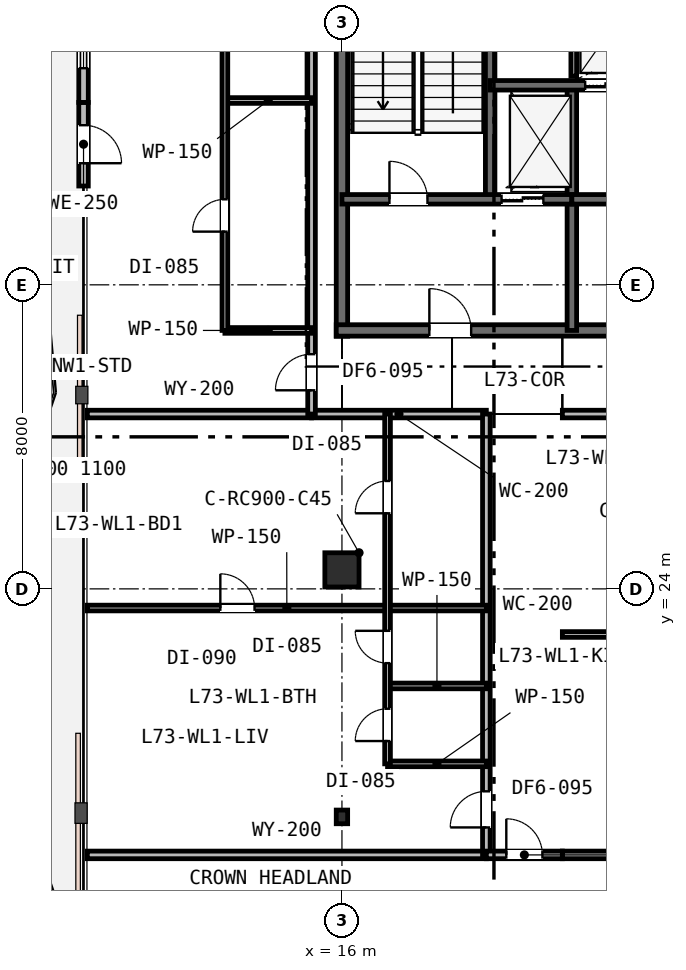
"""IFC4 building model, lengths in metres.
Left out: names, types, materials, properties, quantities, classifications, styles, units other than length and angle.
Written with IfcOpenShell. Run it as: python <this file> out.ifc"""

import sys

from ifc_helpers import new_model, si_unit, direction, frame, frame_2d, origin, origin_2d, place, context, subcontext, project, spatial, rectangle, i_section, extrude, element, fill, save


model = new_model("IFC4")
c1 = context("Model", 3, precision=1e-05, world=origin(), true_north=direction((0.0, 1.0)))
c2 = subcontext(c1, "Body", "Model", "MODEL_VIEW")
j1 = project(units=[si_unit("LENGTHUNIT", "METRE"), si_unit("PLANEANGLEUNIT", "RADIAN")], contexts=[c1])
p1 = place(None, origin())
s1 = spatial("IfcSite", under=j1, at=p1, CompositionType="ELEMENT")
p2 = place(p1, origin())
s2 = spatial("IfcBuilding", under=s1, at=p2, CompositionType="ELEMENT")
p3 = place(p2, frame((0.0, 0.0, 283.0)))
s3 = spatial("IfcBuildingStorey", under=s2, at=p3, CompositionType="ELEMENT", Elevation=283.0)
p4 = place(p3, frame((16.0, 30.65, 0.0), z_axis=(0.0, 0.0, 1.0), x_axis=(0.0, 1.0, 0.0)))
e1 = element("IfcWall", 1, at=p4, inside=s3, PredefinedType="SHEAR", context=c2, shape_type="SweptSolid", body=[
    extrude(rectangle(XDim=12.3, YDim=0.3, at=frame_2d((6.15, 0.0))), origin(), (0.0, 0.0, 1.0), 3.8),
])
p5 = place(p3, frame((15.85, 30.8, 0.0), z_axis=(0.0, 0.0, 1.0), x_axis=(1.0, 0.0, 0.0)))
e2 = element("IfcWall", 2, at=p5, inside=s3, PredefinedType="SHEAR", context=c2, shape_type="SweptSolid", body=[
    extrude(rectangle(XDim=11.2, YDim=0.3, at=frame_2d((5.6, 0.0))), origin(), (0.0, 0.0, 1.0), 3.8),
])
p6 = place(p5, frame((2.45, 0.0, 0.0)))
e3 = element("IfcOpeningElement", 3, at=p6, cuts=e2, PredefinedType="OPENING", context=c2, shape_type="SweptSolid", body=[
    extrude(rectangle(XDim=1.1, YDim=2.15, at=frame_2d((0.55, 1.075))), frame((0.0, 0.16, 0.0), z_axis=(0.0, -1.0, 0.0), x_axis=(1.0, 0.0, 0.0)), (0.0, 0.0, 1.0), 0.32),
])
p7 = place(p3, frame((19.9, 34.25, 0.0), z_axis=(0.0, 0.0, 1.0), x_axis=(0.0, 1.0, 0.0)))
e4 = element("IfcWall", 4, at=p7, inside=s3, PredefinedType="SHEAR", context=c2, shape_type="SweptSolid", body=[
    extrude(rectangle(XDim=8.65, YDim=0.25, at=frame_2d((4.325, 0.0))), origin(), (0.0, 0.0, 1.0), 3.8),
])
p8 = place(p3, frame((22.05, 30.8, 0.0), z_axis=(0.0, 0.0, 1.0), x_axis=(0.0, 1.0, 0.0)))
e5 = element("IfcWall", 5, at=p8, inside=s3, PredefinedType="SHEAR", context=c2, shape_type="SweptSolid", body=[
    extrude(rectangle(XDim=6.45, YDim=0.25, at=frame_2d((3.225, 0.0))), origin(), (0.0, 0.0, 1.0), 3.8),
])
p9 = place(p3, frame((16.0, 34.25, 0.0), z_axis=(0.0, 0.0, 1.0), x_axis=(1.0, 0.0, 0.0)))
e6 = element("IfcWall", 6, at=p9, inside=s3, PredefinedType="SHEAR", context=c2, shape_type="SweptSolid", body=[
    extrude(rectangle(XDim=6.05, YDim=0.25, at=frame_2d((3.025, 0.0))), origin(), (0.0, 0.0, 1.0), 3.8),
])
p10 = place(p9, frame((1.25, 0.0, 0.0)))
e7 = element("IfcOpeningElement", 7, at=p10, cuts=e6, PredefinedType="OPENING", context=c2, shape_type="SweptSolid", body=[
    extrude(rectangle(XDim=1.0, YDim=2.15, at=frame_2d((0.5, 1.075))), frame((0.0, 0.135, 0.0), z_axis=(0.0, -1.0, 0.0), x_axis=(1.0, 0.0, 0.0)), (0.0, 0.0, 1.0), 0.27),
])
p11 = place(p9, frame((4.2, 0.0, 0.0)))
e8 = element("IfcOpeningElement", 8, at=p11, cuts=e6, PredefinedType="OPENING", context=c2, shape_type="SweptSolid", body=[
    extrude(rectangle(XDim=1.1, YDim=2.15, at=frame_2d((0.55, 1.075))), frame((0.0, 0.135, 0.0), z_axis=(0.0, -1.0, 0.0), x_axis=(1.0, 0.0, 0.0)), (0.0, 0.0, 1.0), 0.27),
])
p12 = place(p3, frame((22.05, 34.25, 0.0), z_axis=(0.0, 0.0, 1.0), x_axis=(1.0, 0.0, 0.0)))
e9 = element("IfcWall", 9, at=p12, inside=s3, PredefinedType="SHEAR", context=c2, shape_type="SweptSolid", body=[
    extrude(rectangle(XDim=5.0, YDim=0.25, at=frame_2d((2.5, 0.0))), origin(), (0.0, 0.0, 1.0), 3.8),
])
p13 = place(p12, frame((1.95, 0.0, 0.0)))
e10 = element("IfcOpeningElement", 10, at=p13, cuts=e9, PredefinedType="OPENING", context=c2, shape_type="SweptSolid", body=[
    extrude(rectangle(XDim=1.0, YDim=2.15, at=frame_2d((0.5, 1.075))), frame((0.0, 0.135, 0.0), z_axis=(0.0, -1.0, 0.0), x_axis=(1.0, 0.0, 0.0)), (0.0, 0.0, 1.0), 0.27),
])
p14 = place(p3, frame((19.9, 37.25, 0.0), z_axis=(0.0, 0.0, 1.0), x_axis=(1.0, 0.0, 0.0)))
e11 = element("IfcWall", 11, at=p14, inside=s3, PredefinedType="SHEAR", context=c2, shape_type="SweptSolid", body=[
    extrude(rectangle(XDim=16.2, YDim=0.25, at=frame_2d((8.1, 0.0))), origin(), (0.0, 0.0, 1.0), 3.8),
])
p15 = place(p14, frame((12.55, 0.0, 0.0)))
e12 = element("IfcOpeningElement", 12, at=p15, cuts=e11, PredefinedType="OPENING", context=c2, shape_type="SweptSolid", body=[
    extrude(rectangle(XDim=0.9, YDim=2.15, at=frame_2d((0.45, 1.075))), frame((0.0, 0.135, 0.0), z_axis=(0.0, -1.0, 0.0), x_axis=(1.0, 0.0, 0.0)), (0.0, 0.0, 1.0), 0.27),
])
p16 = place(p14, frame((2.5, 0.0, 0.0)))
e13 = element("IfcOpeningElement", 13, at=p16, cuts=e11, PredefinedType="OPENING", context=c2, shape_type="SweptSolid", body=[
    extrude(rectangle(XDim=1.05, YDim=2.15, at=frame_2d((0.525, 1.075))), frame((0.0, 0.135, 0.0), z_axis=(0.0, -1.0, 0.0), x_axis=(1.0, 0.0, 0.0)), (0.0, 0.0, 1.0), 0.27),
])
p17 = place(p14, frame((4.4, 0.0, 0.0)))
e14 = element("IfcOpeningElement", 14, at=p17, cuts=e11, PredefinedType="OPENING", context=c2, shape_type="SweptSolid", body=[
    extrude(rectangle(XDim=1.05, YDim=2.15, at=frame_2d((0.525, 1.075))), frame((0.0, 0.135, 0.0), z_axis=(0.0, -1.0, 0.0), x_axis=(1.0, 0.0, 0.0)), (0.0, 0.0, 1.0), 0.27),
])
p18 = place(p14, frame((6.3, 0.0, 0.0)))
e15 = element("IfcOpeningElement", 15, at=p18, cuts=e11, PredefinedType="OPENING", context=c2, shape_type="SweptSolid", body=[
    extrude(rectangle(XDim=1.05, YDim=2.15, at=frame_2d((0.525, 1.075))), frame((0.0, 0.135, 0.0), z_axis=(0.0, -1.0, 0.0), x_axis=(1.0, 0.0, 0.0)), (0.0, 0.0, 1.0), 0.27),
])
p19 = place(p3, frame((16.0, 24.5, 0.0), z_axis=(0.0, 0.0, 1.0), x_axis=(1.0, 0.0, 0.0)))
e16 = element("IfcColumn", 16, at=p19, inside=s3, PredefinedType="COLUMN", context=c2, shape_type="SweptSolid", body=[
    extrude(rectangle(XDim=0.9, YDim=0.9, at=origin_2d()), origin(), (0.0, 0.0, 1.0), 3.8),
])
p20 = place(p3, frame((16.0, 18.0, 0.0), z_axis=(0.0, 0.0, 1.0), x_axis=(1.0, 0.0, 0.0)))
e17 = element("IfcColumn", 17, at=p20, inside=s3, PredefinedType="COLUMN", context=c2, shape_type="SweptSolid", body=[
    extrude(i_section(OverallWidth=0.3, OverallDepth=0.36, WebThickness=0.013, FlangeThickness=0.022, FilletRadius=0.027, at=origin_2d()), origin(), (0.0, 0.0, 1.0), 3.8),
])
p21 = place(p3, frame((9.2, 36.8, 0.0), z_axis=(0.0, 0.0, 1.0), x_axis=(0.0, -1.0, 0.0)))
e18 = element("IfcWall", 18, at=p21, inside=s3, PredefinedType="STANDARD", context=c2, shape_type="SweptSolid", body=[
    extrude(rectangle(XDim=2.2, YDim=0.25, at=frame_2d((1.1, 0.0))), origin(), (0.0, 0.0, 1.0), 3.53),
])
p22 = place(p21, frame((0.6, 0.0, 0.0)))
e19 = element("IfcOpeningElement", 19, at=p22, cuts=e18, PredefinedType="OPENING", context=c2, shape_type="SweptSolid", body=[
    extrude(rectangle(XDim=1.0, YDim=2.15, at=frame_2d((0.5, 1.075))), frame((0.0, 0.135, 0.0), z_axis=(0.0, -1.0, 0.0), x_axis=(1.0, 0.0, 0.0)), (0.0, 0.0, 1.0), 0.27),
])
p23 = place(p3, frame((9.2, 40.4, 0.0), z_axis=(0.0, 0.0, 1.0), x_axis=(0.0, -1.0, 0.0)))
e20 = element("IfcWall", 20, at=p23, inside=s3, PredefinedType="STANDARD", context=c2, shape_type="SweptSolid", body=[
    extrude(rectangle(XDim=3.6, YDim=0.25, at=frame_2d((1.8, 0.0))), origin(), (0.0, 0.0, 1.0), 3.53),
])
p24 = place(p23, frame((0.9, 0.0, 0.75)))
e21 = element("IfcOpeningElement", 21, at=p24, cuts=e20, PredefinedType="OPENING", context=c2, shape_type="SweptSolid", body=[
    extrude(rectangle(XDim=1.8, YDim=1.85, at=frame_2d((0.9, 0.925))), frame((0.0, 0.135, 0.0), z_axis=(0.0, -1.0, 0.0), x_axis=(1.0, 0.0, 0.0)), (0.0, 0.0, 1.0), 0.27),
])
p25 = place(p3, frame((22.1, 37.49, 0.0), z_axis=(0.0, 0.0, 1.0), x_axis=(0.0, 1.0, 0.0)))
e22 = element("IfcWall", 22, at=p25, inside=s3, PredefinedType="PLUMBINGWALL", context=c2, shape_type="SweptSolid", body=[
    extrude(rectangle(XDim=2.56, YDim=0.15, at=frame_2d((1.28, 0.0))), origin(), (0.0, 0.0, 1.0), 3.53),
])
p26 = place(p3, frame((9.3, 28.6, 0.0), z_axis=(0.0, 0.0, 1.0), x_axis=(1.0, 0.0, 0.0)))
e23 = element("IfcWall", 23, at=p26, inside=s3, PredefinedType="PARTITIONING", context=c2, shape_type="SweptSolid", body=[
    extrude(rectangle(XDim=5.9, YDim=0.2, at=frame_2d((2.95, 0.0))), origin(), (0.0, 0.0, 1.0), 3.53),
])
p27 = place(p3, frame((15.2, 28.6, 0.0), z_axis=(0.0, 0.0, 1.0), x_axis=(1.0, 0.0, 0.0)))
e24 = element("IfcWall", 24, at=p27, inside=s3, PredefinedType="PARTITIONING", context=c2, shape_type="SweptSolid", body=[
    extrude(rectangle(XDim=4.6, YDim=0.2, at=frame_2d((2.3, 0.0))), origin(), (0.0, 0.0, 1.0), 3.24),
])
p28 = place(p3, frame((21.8, 28.6, 0.0), z_axis=(0.0, 0.0, 1.0), x_axis=(1.0, 0.0, 0.0)))
e25 = element("IfcWall", 25, at=p28, inside=s3, PredefinedType="PARTITIONING", context=c2, shape_type="SweptSolid", body=[
    extrude(rectangle(XDim=24.1, YDim=0.2, at=frame_2d((12.05, 0.0))), origin(), (0.0, 0.0, 1.0), 3.24),
])
p29 = place(p28, frame((5.525, 0.0, 0.0)))
e26 = element("IfcOpeningElement", 26, at=p29, cuts=e25, PredefinedType="OPENING", context=c2, shape_type="SweptSolid", body=[
    extrude(rectangle(XDim=0.95, YDim=2.15, at=frame_2d((0.475, 1.075))), frame((0.0, 0.11, 0.0), z_axis=(0.0, -1.0, 0.0), x_axis=(1.0, 0.0, 0.0)), (0.0, 0.0, 1.0), 0.22),
])
p30 = place(p28, frame((13.025, 0.0, 0.0)))
e27 = element("IfcOpeningElement", 27, at=p30, cuts=e25, PredefinedType="OPENING", context=c2, shape_type="SweptSolid", body=[
    extrude(rectangle(XDim=0.95, YDim=2.15, at=frame_2d((0.475, 1.075))), frame((0.0, 0.11, 0.0), z_axis=(0.0, -1.0, 0.0), x_axis=(1.0, 0.0, 0.0)), (0.0, 0.0, 1.0), 0.22),
])
p31 = place(p28, frame((17.625, 0.0, 0.0)))
e28 = element("IfcOpeningElement", 28, at=p31, cuts=e25, PredefinedType="OPENING", context=c2, shape_type="SweptSolid", body=[
    extrude(rectangle(XDim=0.95, YDim=2.15, at=frame_2d((0.475, 1.075))), frame((0.0, 0.11, 0.0), z_axis=(0.0, -1.0, 0.0), x_axis=(1.0, 0.0, 0.0)), (0.0, 0.0, 1.0), 0.22),
])
p32 = place(p3, frame((15.2, 28.6, 0.0), z_axis=(0.0, 0.0, 1.0), x_axis=(0.0, 1.0, 0.0)))
e29 = element("IfcWall", 29, at=p32, inside=s3, PredefinedType="PARTITIONING", context=c2, shape_type="SweptSolid", body=[
    extrude(rectangle(XDim=14.3, YDim=0.2, at=frame_2d((7.15, 0.0))), origin(), (0.0, 0.0, 1.0), 3.53),
])
p33 = place(p32, frame((0.625, 0.0, 0.0)))
e30 = element("IfcOpeningElement", 30, at=p33, cuts=e29, PredefinedType="OPENING", context=c2, shape_type="SweptSolid", body=[
    extrude(rectangle(XDim=0.95, YDim=2.15, at=frame_2d((0.475, 1.075))), frame((0.0, 0.11, 0.0), z_axis=(0.0, -1.0, 0.0), x_axis=(1.0, 0.0, 0.0)), (0.0, 0.0, 1.0), 0.22),
])
for number, where, z_axis, x_axis in (
    (31, (12.92, 30.8, 0.0), (0.0, 0.0, 1.0), (1.0, 0.0, 0.0)),
    (32, (12.92, 36.85, 0.0), (0.0, 0.0, 1.0), (1.0, 0.0, 0.0)),
):
    element("IfcWall", number, at=place(p3, frame(where, z_axis=z_axis, x_axis=x_axis)), inside=s3, PredefinedType="PARTITIONING", context=c2, shape_type="SweptSolid", body=[
        extrude(rectangle(XDim=2.28, YDim=0.15, at=frame_2d((1.14, 0.0))), origin(), (0.0, 0.0, 1.0), 3.53),
    ])
p34 = place(p3, frame((12.92, 30.8, 0.0), z_axis=(0.0, 0.0, 1.0), x_axis=(0.0, 1.0, 0.0)))
e33 = element("IfcWall", 33, at=p34, inside=s3, PredefinedType="PARTITIONING", context=c2, shape_type="SweptSolid", body=[
    extrude(rectangle(XDim=12.1, YDim=0.15, at=frame_2d((6.05, 0.0))), origin(), (0.0, 0.0, 1.0), 3.53),
])
p35 = place(p34, frame((2.6, 0.0, 0.0)))
e34 = element("IfcOpeningElement", 34, at=p35, cuts=e33, PredefinedType="OPENING", context=c2, shape_type="SweptSolid", body=[
    extrude(rectangle(XDim=0.85, YDim=2.15, at=frame_2d((0.425, 1.075))), frame((0.0, 0.085, 0.0), z_axis=(0.0, -1.0, 0.0), x_axis=(1.0, 0.0, 0.0)), (0.0, 0.0, 1.0), 0.17),
])
p36 = place(p34, frame((8.65, 0.0, 0.0)))
e35 = element("IfcOpeningElement", 35, at=p36, cuts=e33, PredefinedType="OPENING", context=c2, shape_type="SweptSolid", body=[
    extrude(rectangle(XDim=0.85, YDim=2.15, at=frame_2d((0.425, 1.075))), frame((0.0, 0.085, 0.0), z_axis=(0.0, -1.0, 0.0), x_axis=(1.0, 0.0, 0.0)), (0.0, 0.0, 1.0), 0.17),
])
p37 = place(p3, frame((9.3, 17.0, 0.0), z_axis=(0.0, 0.0, 1.0), x_axis=(1.0, 0.0, 0.0)))
e36 = element("IfcWall", 36, at=p37, inside=s3, PredefinedType="PARTITIONING", context=c2, shape_type="SweptSolid", body=[
    extrude(rectangle(XDim=10.5, YDim=0.2, at=frame_2d((5.25, 0.0))), origin(), (0.0, 0.0, 1.0), 3.24),
])
p38 = place(p3, frame((21.8, 17.0, 0.0), z_axis=(0.0, 0.0, 1.0), x_axis=(1.0, 0.0, 0.0)))
e37 = element("IfcWall", 37, at=p38, inside=s3, PredefinedType="PARTITIONING", context=c2, shape_type="SweptSolid", body=[
    extrude(rectangle(XDim=2.1, YDim=0.2, at=frame_2d((1.05, 0.0))), origin(), (0.0, 0.0, 1.0), 3.53),
])
p39 = place(p3, frame((19.8, 17.0, 0.0), z_axis=(0.0, 0.0, 1.0), x_axis=(0.0, 1.0, 0.0)))
e38 = element("IfcWall", 38, at=p39, inside=s3, PredefinedType="PARTITIONING", context=c2, shape_type="SweptSolid", body=[
    extrude(rectangle(XDim=11.6, YDim=0.2, at=frame_2d((5.8, 0.0))), origin(), (0.0, 0.0, 1.0), 3.24),
])
p40 = place(p39, frame((0.723, 0.0, 0.0)))
e39 = element("IfcOpeningElement", 39, at=p40, cuts=e38, PredefinedType="OPENING", context=c2, shape_type="SweptSolid", body=[
    extrude(rectangle(XDim=0.95, YDim=2.15, at=frame_2d((0.475, 1.075))), frame((0.0, 0.11, 0.0), z_axis=(0.0, -1.0, 0.0), x_axis=(1.0, 0.0, 0.0)), (0.0, 0.0, 1.0), 0.22),
])
for number, where, z_axis, x_axis in (
    (40, (17.2, 19.396, 0.0), (0.0, 0.0, 1.0), (1.0, 0.0, 0.0)),
    (41, (17.2, 21.446, 0.0), (0.0, 0.0, 1.0), (1.0, 0.0, 0.0)),
):
    element("IfcWall", number, at=place(p3, frame(where, z_axis=z_axis, x_axis=x_axis)), inside=s3, PredefinedType="PARTITIONING", context=c2, shape_type="SweptSolid", body=[
        extrude(rectangle(XDim=2.6, YDim=0.15, at=frame_2d((1.3, 0.0))), origin(), (0.0, 0.0, 1.0), 3.53),
    ])
p41 = place(p3, frame((9.3, 23.496, 0.0), z_axis=(0.0, 0.0, 1.0), x_axis=(1.0, 0.0, 0.0)))
e42 = element("IfcWall", 42, at=p41, inside=s3, PredefinedType="PARTITIONING", context=c2, shape_type="SweptSolid", body=[
    extrude(rectangle(XDim=10.5, YDim=0.15, at=frame_2d((5.25, 0.0))), origin(), (0.0, 0.0, 1.0), 3.24),
])
p42 = place(p41, frame((3.5, 0.0, 0.0)))
e43 = element("IfcOpeningElement", 43, at=p42, cuts=e42, PredefinedType="OPENING", context=c2, shape_type="SweptSolid", body=[
    extrude(rectangle(XDim=0.9, YDim=2.15, at=frame_2d((0.45, 1.075))), frame((0.0, 0.085, 0.0), z_axis=(0.0, -1.0, 0.0), x_axis=(1.0, 0.0, 0.0)), (0.0, 0.0, 1.0), 0.17),
])
p43 = place(p3, frame((17.2, 19.396, 0.0), z_axis=(0.0, 0.0, 1.0), x_axis=(0.0, 1.0, 0.0)))
e44 = element("IfcWall", 44, at=p43, inside=s3, PredefinedType="PARTITIONING", context=c2, shape_type="SweptSolid", body=[
    extrude(rectangle(XDim=9.204, YDim=0.15, at=frame_2d((4.602, 0.0))), origin(), (0.0, 0.0, 1.0), 3.24),
])
p44 = place(p43, frame((0.6, 0.0, 0.0)))
e45 = element("IfcOpeningElement", 45, at=p44, cuts=e44, PredefinedType="OPENING", context=c2, shape_type="SweptSolid", body=[
    extrude(rectangle(XDim=0.85, YDim=2.15, at=frame_2d((0.425, 1.075))), frame((0.0, 0.085, 0.0), z_axis=(0.0, -1.0, 0.0), x_axis=(1.0, 0.0, 0.0)), (0.0, 0.0, 1.0), 0.17),
])
p45 = place(p43, frame((2.65, 0.0, 0.0)))
e46 = element("IfcOpeningElement", 46, at=p45, cuts=e44, PredefinedType="OPENING", context=c2, shape_type="SweptSolid", body=[
    extrude(rectangle(XDim=0.85, YDim=2.15, at=frame_2d((0.425, 1.075))), frame((0.0, 0.085, 0.0), z_axis=(0.0, -1.0, 0.0), x_axis=(1.0, 0.0, 0.0)), (0.0, 0.0, 1.0), 0.17),
])
p46 = place(p43, frame((6.593, 0.0, 0.0)))
e47 = element("IfcOpeningElement", 47, at=p46, cuts=e44, PredefinedType="OPENING", context=c2, shape_type="SweptSolid", body=[
    extrude(rectangle(XDim=0.85, YDim=2.15, at=frame_2d((0.425, 1.075))), frame((0.0, 0.085, 0.0), z_axis=(0.0, -1.0, 0.0), x_axis=(1.0, 0.0, 0.0)), (0.0, 0.0, 1.0), 0.17),
])
p47 = place(p3, frame((21.8, 22.8, 0.0), z_axis=(0.0, 0.0, 1.0), x_axis=(1.0, 0.0, 0.0)))
e48 = element("IfcWall", 48, at=p47, inside=s3, PredefinedType="PARTITIONING", context=c2, shape_type="SweptSolid", body=[
    extrude(rectangle(XDim=2.1, YDim=0.15, at=frame_2d((1.05, 0.0))), origin(), (0.0, 0.0, 1.0), 3.53),
])
p48 = place(p3, frame((19.8, 17.0, 0.0), z_axis=(0.0, 0.0, 1.0), x_axis=(1.0, 0.0, 0.0)))
e49 = element("IfcWall", 49, at=p48, inside=s3, PredefinedType="PARTITIONING", context=c2, shape_type="SweptSolid", body=[
    extrude(rectangle(XDim=2.0, YDim=0.2, at=frame_2d((1.0, 0.0))), origin(), (0.0, 0.0, 1.0), 3.53),
])
p49 = place(p48, frame((0.525, 0.0, 0.0)))
e50 = element("IfcOpeningElement", 50, at=p49, cuts=e49, PredefinedType="OPENING", context=c2, shape_type="SweptSolid", body=[
    extrude(rectangle(XDim=0.95, YDim=2.15, at=frame_2d((0.475, 1.075))), frame((0.0, 0.11, 0.0), z_axis=(0.0, -1.0, 0.0), x_axis=(1.0, 0.0, 0.0)), (0.0, 0.0, 1.0), 0.22),
])
p50 = place(p22, origin())
e51 = element("IfcDoor", 51, at=p50, inside=s3, OperationType="SINGLE_SWING_RIGHT", PredefinedType="DOOR", context=c2, shape_type="SweptSolid", body=[
    extrude(rectangle(XDim=1.0, YDim=2.15, at=frame_2d((0.5, 1.075))), frame((0.0, 0.025, 0.0), z_axis=(0.0, -1.0, 0.0), x_axis=(1.0, 0.0, 0.0)), (0.0, 0.0, 1.0), 0.05),
])
fill(e19, e51)
p51 = place(p24, origin())
e52 = element("IfcWindow", 52, at=p51, inside=s3, PartitioningType="SINGLE_PANEL", PredefinedType="WINDOW", context=c2, shape_type="SweptSolid", body=[
    extrude(rectangle(XDim=1.8, YDim=1.85, at=frame_2d((0.9, 0.925))), frame((0.0, 0.03, 0.0), z_axis=(0.0, -1.0, 0.0), x_axis=(1.0, 0.0, 0.0)), (0.0, 0.0, 1.0), 0.06),
])
fill(e21, e52)
p52 = place(p10, origin())
e53 = element("IfcDoor", 53, at=p52, inside=s3, OperationType="SINGLE_SWING_LEFT", PredefinedType="DOOR", context=c2, shape_type="SweptSolid", body=[
    extrude(rectangle(XDim=1.0, YDim=2.15, at=frame_2d((0.5, 1.075))), frame((0.0, 0.025, 0.0), z_axis=(0.0, -1.0, 0.0), x_axis=(1.0, 0.0, 0.0)), (0.0, 0.0, 1.0), 0.05),
])
fill(e7, e53)
p53 = place(p6, origin())
e54 = element("IfcDoor", 54, at=p53, inside=s3, OperationType="SINGLE_SWING_LEFT", PredefinedType="DOOR", context=c2, shape_type="SweptSolid", body=[
    extrude(rectangle(XDim=1.1, YDim=2.15, at=frame_2d((0.55, 1.075))), frame((0.0, 0.025, 0.0), z_axis=(0.0, -1.0, 0.0), x_axis=(1.0, 0.0, 0.0)), (0.0, 0.0, 1.0), 0.05),
])
fill(e3, e54)
p54 = place(p33, origin())
e55 = element("IfcDoor", 55, at=p54, inside=s3, OperationType="SINGLE_SWING_LEFT", PredefinedType="DOOR", context=c2, shape_type="SweptSolid", body=[
    extrude(rectangle(XDim=0.95, YDim=2.15, at=frame_2d((0.475, 1.075))), frame((0.0, 0.025, 0.0), z_axis=(0.0, -1.0, 0.0), x_axis=(1.0, 0.0, 0.0)), (0.0, 0.0, 1.0), 0.05),
])
fill(e30, e55)
p55 = place(p35, origin())
e56 = element("IfcDoor", 56, at=p55, inside=s3, OperationType="SINGLE_SWING_LEFT", PredefinedType="DOOR", context=c2, shape_type="SweptSolid", body=[
    extrude(rectangle(XDim=0.85, YDim=2.15, at=frame_2d((0.425, 1.075))), frame((0.0, 0.025, 0.0), z_axis=(0.0, -1.0, 0.0), x_axis=(1.0, 0.0, 0.0)), (0.0, 0.0, 1.0), 0.05),
])
fill(e34, e56)
p56 = place(p40, origin())
e57 = element("IfcDoor", 57, at=p56, inside=s3, OperationType="SINGLE_SWING_LEFT", PredefinedType="DOOR", context=c2, shape_type="SweptSolid", body=[
    extrude(rectangle(XDim=0.95, YDim=2.15, at=frame_2d((0.475, 1.075))), frame((0.0, 0.025, 0.0), z_axis=(0.0, -1.0, 0.0), x_axis=(1.0, 0.0, 0.0)), (0.0, 0.0, 1.0), 0.05),
])
fill(e39, e57)
p57 = place(p44, origin())
e58 = element("IfcDoor", 58, at=p57, inside=s3, OperationType="SINGLE_SWING_LEFT", PredefinedType="DOOR", context=c2, shape_type="SweptSolid", body=[
    extrude(rectangle(XDim=0.85, YDim=2.15, at=frame_2d((0.425, 1.075))), frame((0.0, 0.025, 0.0), z_axis=(0.0, -1.0, 0.0), x_axis=(1.0, 0.0, 0.0)), (0.0, 0.0, 1.0), 0.05),
])
fill(e45, e58)
p58 = place(p45, origin())
e59 = element("IfcDoor", 59, at=p58, inside=s3, OperationType="SINGLE_SWING_RIGHT", PredefinedType="DOOR", context=c2, shape_type="SweptSolid", body=[
    extrude(rectangle(XDim=0.85, YDim=2.15, at=frame_2d((0.425, 1.075))), frame((0.0, 0.025, 0.0), z_axis=(0.0, -1.0, 0.0), x_axis=(1.0, 0.0, 0.0)), (0.0, 0.0, 1.0), 0.05),
])
fill(e46, e59)
p59 = place(p46, origin())
e60 = element("IfcDoor", 60, at=p59, inside=s3, OperationType="SINGLE_SWING_LEFT", PredefinedType="DOOR", context=c2, shape_type="SweptSolid", body=[
    extrude(rectangle(XDim=0.85, YDim=2.15, at=frame_2d((0.425, 1.075))), frame((0.0, 0.025, 0.0), z_axis=(0.0, -1.0, 0.0), x_axis=(1.0, 0.0, 0.0)), (0.0, 0.0, 1.0), 0.05),
])
fill(e47, e60)
p60 = place(p42, origin())
e61 = element("IfcDoor", 61, at=p60, inside=s3, OperationType="SINGLE_SWING_LEFT", PredefinedType="DOOR", context=c2, shape_type="SweptSolid", body=[
    extrude(rectangle(XDim=0.9, YDim=2.15, at=frame_2d((0.45, 1.075))), frame((0.0, 0.025, 0.0), z_axis=(0.0, -1.0, 0.0), x_axis=(1.0, 0.0, 0.0)), (0.0, 0.0, 1.0), 0.05),
])
fill(e43, e61)
p61 = place(p49, origin())
e62 = element("IfcDoor", 62, at=p61, inside=s3, OperationType="SINGLE_SWING_LEFT", PredefinedType="DOOR", context=c2, shape_type="SweptSolid", body=[
    extrude(rectangle(XDim=0.95, YDim=2.15, at=frame_2d((0.475, 1.075))), frame((0.0, 0.025, 0.0), z_axis=(0.0, -1.0, 0.0), x_axis=(1.0, 0.0, 0.0)), (0.0, 0.0, 1.0), 0.05),
])
fill(e50, e62)
p62 = place(p11, origin())
e63 = element("IfcDoor", 63, at=p62, inside=s3, OperationType="DOUBLE_DOOR_SLIDING", PredefinedType="DOOR", context=c2, shape_type="SweptSolid", body=[
    extrude(rectangle(XDim=1.1, YDim=2.15, at=frame_2d((0.55, 1.075))), frame((0.0, 0.025, 0.0), z_axis=(0.0, -1.0, 0.0), x_axis=(1.0, 0.0, 0.0)), (0.0, 0.0, 1.0), 0.05),
])
fill(e8, e63)
p63 = place(p16, origin())
e64 = element("IfcDoor", 64, at=p63, inside=s3, OperationType="DOUBLE_DOOR_SLIDING", PredefinedType="DOOR", context=c2, shape_type="SweptSolid", body=[
    extrude(rectangle(XDim=1.05, YDim=2.15, at=frame_2d((0.525, 1.075))), frame((0.0, 0.025, 0.0), z_axis=(0.0, -1.0, 0.0), x_axis=(1.0, 0.0, 0.0)), (0.0, 0.0, 1.0), 0.05),
])
fill(e13, e64)
save(model, sys.argv[1])
